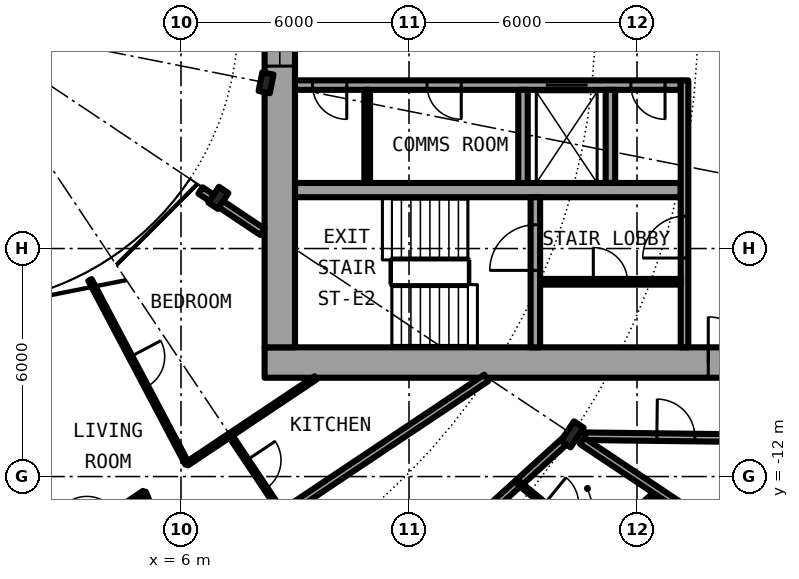
"""IFC4 building model, lengths in metres.
Left out: names, types, materials, properties, quantities, classifications, styles, units other than length and angle.
Written with IfcOpenShell. Run it as: python <this file> out.ifc"""

import sys

from ifc_helpers import new_model, si_unit, direction, frame, frame_2d, origin, origin_2d, place, context, subcontext, project, spatial, rectangle, i_section, extrude, element, fill, save


model = new_model("IFC4")
c1 = context("Model", 3, precision=1e-05, world=origin(), true_north=direction((0.0, 1.0)))
c2 = subcontext(c1, "Body", "Model", "MODEL_VIEW")
j1 = project(units=[si_unit("LENGTHUNIT", "METRE"), si_unit("PLANEANGLEUNIT", "RADIAN")], contexts=[c1])
p1 = place(None, origin())
s1 = spatial("IfcSite", under=j1, at=p1, CompositionType="ELEMENT")
p2 = place(p1, origin())
s2 = spatial("IfcBuilding", under=s1, at=p2, CompositionType="ELEMENT")
p3 = place(p2, frame((0.0, 0.0, 28.9)))
s3 = spatial("IfcBuildingStorey", under=s2, at=p3, CompositionType="ELEMENT", Elevation=28.9)
p4 = place(p3, frame((16.297, -10.889, 0.0), z_axis=(0.0, 0.0, 1.0), x_axis=(0.831469612303, -0.55557023302, 0.0)))
e1 = element("IfcColumn", 1, at=p4, inside=s3, PredefinedType="COLUMN", context=c2, shape_type="SweptSolid", body=[
    extrude(i_section(OverallWidth=0.305, OverallDepth=0.62, WebThickness=0.021, FlangeThickness=0.04, FilletRadius=0.027, at=origin_2d()), origin(), (0.0, 0.0, 1.0), 3.05),
])
for number, where, z_axis, x_axis in (
    (2, (6.984, -4.667, 0.0), (0.0, 0.0, 1.0), (0.831, -0.556, 0.0)),
    (3, (8.239, -1.639, 0.0), (0.0, 0.0, 1.0), (0.981, -0.195, 0.0)),
):
    element("IfcColumn", number, at=place(p3, frame(where, z_axis=z_axis, x_axis=x_axis)), inside=s3, PredefinedType="COLUMN", context=c2, shape_type="SweptSolid", body=[
        extrude(i_section(OverallWidth=0.3, OverallDepth=0.5, WebThickness=0.014, FlangeThickness=0.028, FilletRadius=0.027, at=origin_2d()), origin(), (0.0, 0.0, 1.0), 3.05),
    ])
p5 = place(p3, frame((8.2, -9.0, 0.0), z_axis=(0.0, 0.0, 1.0), x_axis=(1.0, 0.0, 0.0)))
e4 = element("IfcWall", 4, at=p5, inside=s3, PredefinedType="SHEAR", context=c2, shape_type="SweptSolid", body=[
    extrude(rectangle(XDim=14.2, YDim=0.8, at=frame_2d((7.1, 0.0))), origin(), (0.0, 0.0, 1.0), 3.05),
])
p6 = place(p5, frame((11.675, 0.0, 0.0)))
e5 = element("IfcOpeningElement", 5, at=p6, cuts=e4, PredefinedType="OPENING", context=c2, shape_type="SweptSolid", body=[
    extrude(rectangle(XDim=1.2, YDim=2.3, at=frame_2d((0.6, 1.15))), frame((0.0, 0.41, 0.0), z_axis=(0.0, -1.0, 0.0), x_axis=(1.0, 0.0, 0.0)), (0.0, 0.0, 1.0), 0.82),
])
p7 = place(p3, frame((8.6, -8.6, 0.0), z_axis=(0.0, 0.0, 1.0), x_axis=(0.0, 1.0, 0.0)))
e6 = element("IfcWall", 6, at=p7, inside=s3, PredefinedType="SHEAR", context=c2, shape_type="SweptSolid", body=[
    extrude(rectangle(XDim=17.2, YDim=0.8, at=frame_2d((8.6, 0.0))), origin(), (0.0, 0.0, 1.0), 3.05),
])
p8 = place(p7, frame((7.4, 0.0, 0.1)))
e7 = element("IfcOpeningElement", 7, at=p8, cuts=e6, PredefinedType="OPENING", context=c2, shape_type="SweptSolid", body=[
    extrude(rectangle(XDim=2.4, YDim=2.2, at=frame_2d((1.2, 1.1))), frame((0.0, 0.41, 0.0), z_axis=(0.0, -1.0, 0.0), x_axis=(1.0, 0.0, 0.0)), (0.0, 0.0, 1.0), 0.82),
])
p9 = place(p3, frame((19.15, -1.7, 0.0), z_axis=(0.0, 0.0, 1.0), x_axis=(-1.0, 0.0, 0.0)))
e8 = element("IfcWall", 8, at=p9, inside=s3, PredefinedType="SHEAR", context=c2, shape_type="SweptSolid", body=[
    extrude(rectangle(XDim=10.15, YDim=0.25, at=frame_2d((5.075, 0.0))), origin(), (0.0, 0.0, 1.0), 3.05),
])
p10 = place(p9, frame((2.45, 0.0, 0.0)))
e9 = element("IfcOpeningElement", 9, at=p10, cuts=e8, PredefinedType="OPENING", context=c2, shape_type="SweptSolid", body=[
    extrude(rectangle(XDim=1.1, YDim=2.3, at=frame_2d((0.55, 1.15))), frame((0.0, 0.135, 0.0), z_axis=(0.0, -1.0, 0.0), x_axis=(1.0, 0.0, 0.0)), (0.0, 0.0, 1.0), 0.27),
])
p11 = place(p9, frame((8.788, 0.0, 0.0)))
e10 = element("IfcOpeningElement", 10, at=p11, cuts=e8, PredefinedType="OPENING", context=c2, shape_type="SweptSolid", body=[
    extrude(rectangle(XDim=0.9, YDim=2.3, at=frame_2d((0.45, 1.15))), frame((0.0, 0.135, 0.0), z_axis=(0.0, -1.0, 0.0), x_axis=(1.0, 0.0, 0.0)), (0.0, 0.0, 1.0), 0.27),
])
p12 = place(p9, frame((5.775, 0.0, 0.0)))
e11 = element("IfcOpeningElement", 11, at=p12, cuts=e8, PredefinedType="OPENING", context=c2, shape_type="SweptSolid", body=[
    extrude(rectangle(XDim=0.9, YDim=2.3, at=frame_2d((0.45, 1.15))), frame((0.0, 0.135, 0.0), z_axis=(0.0, -1.0, 0.0), x_axis=(1.0, 0.0, 0.0)), (0.0, 0.0, 1.0), 0.27),
])
p13 = place(p9, frame((0.413, 0.0, 0.0)))
e12 = element("IfcOpeningElement", 12, at=p13, cuts=e8, PredefinedType="OPENING", context=c2, shape_type="SweptSolid", body=[
    extrude(rectangle(XDim=0.9, YDim=2.3, at=frame_2d((0.45, 1.15))), frame((0.0, 0.135, 0.0), z_axis=(0.0, -1.0, 0.0), x_axis=(1.0, 0.0, 0.0)), (0.0, 0.0, 1.0), 0.27),
])
p14 = place(p3, frame((9.0, -4.462, 0.0), z_axis=(0.0, 0.0, 1.0), x_axis=(1.0, 0.0, 0.0)))
e13 = element("IfcWall", 13, at=p14, inside=s3, PredefinedType="SHEAR", context=c2, shape_type="SweptSolid", body=[
    extrude(rectangle(XDim=10.15, YDim=0.375, at=frame_2d((5.075, 0.0))), origin(), (0.0, 0.0, 1.0), 3.05),
])
p15 = place(p3, frame((15.325, -8.6, 0.0), z_axis=(0.0, 0.0, 1.0), x_axis=(0.0, 1.0, 0.0)))
e14 = element("IfcWall", 14, at=p15, inside=s3, PredefinedType="SHEAR", context=c2, shape_type="SweptSolid", body=[
    extrude(rectangle(XDim=3.95, YDim=0.25, at=frame_2d((1.975, 0.0))), origin(), (0.0, 0.0, 1.0), 3.05),
])
p16 = place(p15, frame((2.025, 0.0, 0.0)))
e15 = element("IfcOpeningElement", 15, at=p16, cuts=e14, PredefinedType="OPENING", context=c2, shape_type="SweptSolid", body=[
    extrude(rectangle(XDim=1.2, YDim=2.3, at=frame_2d((0.6, 1.15))), frame((0.0, 0.135, 0.0), z_axis=(0.0, -1.0, 0.0), x_axis=(1.0, 0.0, 0.0)), (0.0, 0.0, 1.0), 0.27),
])
for number, where, z_axis, x_axis in (
    (16, (15.0, -1.825, 0.0), (0.0, 0.0, 1.0), (0.0, -1.0, 0.0)),
    (17, (17.3, -1.825, 0.0), (0.0, 0.0, 1.0), (0.0, -1.0, 0.0)),
):
    element("IfcWall", number, at=place(p3, frame(where, z_axis=z_axis, x_axis=x_axis)), inside=s3, PredefinedType="SOLIDWALL", context=c2, shape_type="SweptSolid", body=[
        extrude(rectangle(XDim=2.45, YDim=0.25, at=frame_2d((1.225, 0.0))), origin(), (0.0, 0.0, 1.0), 2.7),
    ])
p17 = place(p3, frame((19.25, -8.6, 0.0), z_axis=(0.0, 0.0, 1.0), x_axis=(0.0, 1.0, 0.0)))
e18 = element("IfcWall", 18, at=p17, inside=s3, PredefinedType="SOLIDWALL", context=c2, shape_type="SweptSolid", body=[
    extrude(rectangle(XDim=7.025, YDim=0.2, at=frame_2d((3.513, 0.0))), origin(), (0.0, 0.0, 1.0), 2.7),
])
p18 = place(p17, frame((2.35, 0.0, 0.0)))
e19 = element("IfcOpeningElement", 19, at=p18, cuts=e18, PredefinedType="OPENING", context=c2, shape_type="SweptSolid", body=[
    extrude(rectangle(XDim=1.1, YDim=2.3, at=frame_2d((0.55, 1.15))), frame((0.0, 0.11, 0.0), z_axis=(0.0, -1.0, 0.0), x_axis=(1.0, 0.0, 0.0)), (0.0, 0.0, 1.0), 0.22),
])
p19 = place(p3, frame((10.9, -1.825, 0.0), z_axis=(0.0, 0.0, 1.0), x_axis=(0.0, -1.0, 0.0)))
e20 = element("IfcWall", 20, at=p19, inside=s3, PredefinedType="PARTITIONING", context=c2, shape_type="SweptSolid", body=[
    extrude(rectangle(XDim=2.45, YDim=0.15, at=frame_2d((1.225, 0.0))), origin(), (0.0, 0.0, 1.0), 2.7),
])
p20 = place(p3, frame((15.45, -6.875, 0.0), z_axis=(0.0, 0.0, 1.0), x_axis=(1.0, 0.0, 0.0)))
e21 = element("IfcWall", 21, at=p20, inside=s3, PredefinedType="PARTITIONING", context=c2, shape_type="SweptSolid", body=[
    extrude(rectangle(XDim=3.7, YDim=0.15, at=frame_2d((1.85, 0.0))), origin(), (0.0, 0.0, 1.0), 2.7),
])
p21 = place(p20, frame((1.4, 0.0, 0.0)))
e22 = element("IfcOpeningElement", 22, at=p21, cuts=e21, PredefinedType="OPENING", context=c2, shape_type="SweptSolid", body=[
    extrude(rectangle(XDim=0.9, YDim=2.3, at=frame_2d((0.45, 1.15))), frame((0.0, 0.085, 0.0), z_axis=(0.0, -1.0, 0.0), x_axis=(1.0, 0.0, 0.0)), (0.0, 0.0, 1.0), 0.17),
])
p22 = place(p3, frame((16.936, -13.845, 0.0), z_axis=(0.0, 0.0, 1.0), x_axis=(0.740836325503, 0.671685595212, 0.0)))
e23 = element("IfcWall", 23, at=p22, inside=s3, PredefinedType="PARTITIONING", context=c2, shape_type="SweptSolid", body=[
    extrude(rectangle(XDim=2.168, YDim=0.1, at=frame_2d((1.084, 0.0))), origin(), (0.0, 0.0, 1.0), 2.7),
])
p23 = place(p3, frame((9.239, -17.286, 0.0), z_axis=(0.0, 0.0, 1.0), x_axis=(0.74089212117, 0.671624050186, 0.0)))
e24 = element("IfcWall", 24, at=p23, inside=s3, PredefinedType="PARTITIONING", context=c2, shape_type="SweptSolid", body=[
    extrude(rectangle(XDim=9.368, YDim=0.2, at=frame_2d((4.684, 0.0))), origin(), (0.0, 0.0, 1.0), 2.38),
])
p24 = place(p23, frame((5.215, 0.0, 0.0)))
e25 = element("IfcOpeningElement", 25, at=p24, cuts=e24, PredefinedType="OPENING", context=c2, shape_type="SweptSolid", body=[
    extrude(rectangle(XDim=1.0, YDim=2.3, at=frame_2d((0.5, 1.15))), frame((0.0, 0.11, 0.0), z_axis=(0.0, -1.0, 0.0), x_axis=(1.0, 0.0, 0.0)), (0.0, 0.0, 1.0), 0.22),
])
p25 = place(p3, frame((3.297, -16.575, 0.0), z_axis=(0.0, 0.0, 1.0), x_axis=(0.831561346449, 0.555432918625, 0.0)))
e26 = element("IfcWall", 26, at=p25, inside=s3, PredefinedType="PARTITIONING", context=c2, shape_type="SweptSolid", body=[
    extrude(rectangle(XDim=12.914, YDim=0.2, at=frame_2d((6.457, 0.0))), origin(), (0.0, 0.0, 1.0), 2.7),
])
p26 = place(p25, frame((4.352, 0.0, 0.0)))
e27 = element("IfcOpeningElement", 27, at=p26, cuts=e26, PredefinedType="OPENING", context=c2, shape_type="SweptSolid", body=[
    extrude(rectangle(XDim=1.0, YDim=2.3, at=frame_2d((0.5, 1.15))), frame((0.0, 0.11, 0.0), z_axis=(0.0, -1.0, 0.0), x_axis=(1.0, 0.0, 0.0)), (0.0, 0.0, 1.0), 0.22),
])
p27 = place(p3, frame((2.77, -13.927, 0.0), z_axis=(0.0, 0.0, 1.0), x_axis=(0.831538390496, 0.555467285384, 0.0)))
e28 = element("IfcWall", 28, at=p27, inside=s3, PredefinedType="PARTITIONING", context=c2, shape_type="SweptSolid", body=[
    extrude(rectangle(XDim=2.717, YDim=0.1, at=frame_2d((1.358, 0.0))), origin(), (0.0, 0.0, 1.0), 2.7),
])
p28 = place(p27, frame((0.908, 0.0, 0.0)))
e29 = element("IfcOpeningElement", 29, at=p28, cuts=e28, PredefinedType="OPENING", context=c2, shape_type="SweptSolid", body=[
    extrude(rectangle(XDim=0.9, YDim=2.3, at=frame_2d((0.45, 1.15))), frame((0.0, 0.06, 0.0), z_axis=(0.0, -1.0, 0.0), x_axis=(1.0, 0.0, 0.0)), (0.0, 0.0, 1.0), 0.12),
])
p29 = place(p3, frame((6.158, -11.664, 0.0), z_axis=(0.0, 0.0, 1.0), x_axis=(0.831459707426, 0.555585056429, 0.0)))
e30 = element("IfcWall", 30, at=p29, inside=s3, PredefinedType="PARTITIONING", context=c2, shape_type="SweptSolid", body=[
    extrude(rectangle(XDim=4.073, YDim=0.1, at=frame_2d((2.037, 0.0))), origin(), (0.0, 0.0, 1.0), 2.7),
])
p30 = place(p3, frame((16.636, -10.939, 0.0), z_axis=(0.0, 0.0, 1.0), x_axis=(0.999926652916, -0.012111514691, 0.0)))
e31 = element("IfcWall", 31, at=p30, inside=s3, PredefinedType="PARTITIONING", context=c2, shape_type="SweptSolid", body=[
    extrude(rectangle(XDim=5.04, YDim=0.2, at=frame_2d((2.52, 0.0))), origin(), (0.0, 0.0, 1.0), 2.7),
])
p31 = place(p30, frame((1.886, 0.0, 0.0)))
e32 = element("IfcOpeningElement", 32, at=p31, cuts=e31, PredefinedType="OPENING", context=c2, shape_type="SweptSolid", body=[
    extrude(rectangle(XDim=1.0, YDim=2.3, at=frame_2d((0.5, 1.15))), frame((0.0, 0.11, 0.0), z_axis=(0.0, -1.0, 0.0), x_axis=(1.0, 0.0, 0.0)), (0.0, 0.0, 1.0), 0.22),
])
p32 = place(p3, frame((6.513, -4.472, 0.0), z_axis=(0.0, 0.0, 1.0), x_axis=(0.831417956244, -0.555647533996, 0.0)))
e33 = element("IfcWall", 33, at=p32, inside=s3, PredefinedType="PARTITIONING", context=c2, shape_type="SweptSolid", body=[
    extrude(rectangle(XDim=1.962, YDim=0.2, at=frame_2d((0.981, 0.0))), origin(), (0.0, 0.0, 1.0), 2.7),
])
p33 = place(p3, frame((3.605, -6.827, 0.0), z_axis=(0.0, 0.0, 1.0), x_axis=(0.466976820365, -0.884269556889, 0.0)))
e34 = element("IfcWall", 34, at=p33, inside=s3, PredefinedType="PARTITIONING", context=c2, shape_type="SweptSolid", body=[
    extrude(rectangle(XDim=5.469, YDim=0.1, at=frame_2d((2.735, 0.0))), origin(), (0.0, 0.0, 1.0), 2.7),
])
p34 = place(p33, frame((2.284, 0.0, 0.0)))
e35 = element("IfcOpeningElement", 35, at=p34, cuts=e34, PredefinedType="OPENING", context=c2, shape_type="SweptSolid", body=[
    extrude(rectangle(XDim=0.9, YDim=2.3, at=frame_2d((0.45, 1.15))), frame((0.0, 0.06, 0.0), z_axis=(0.0, -1.0, 0.0), x_axis=(1.0, 0.0, 0.0)), (0.0, 0.0, 1.0), 0.12),
])
p35 = place(p3, frame((5.029, -12.418, 0.0), z_axis=(0.0, 0.0, 1.0), x_axis=(0.375649498413, -0.926761811008, 0.0)))
e36 = element("IfcWall", 36, at=p35, inside=s3, PredefinedType="PARTITIONING", context=c2, shape_type="SweptSolid", body=[
    extrude(rectangle(XDim=2.548, YDim=0.1, at=frame_2d((1.274, 0.0))), origin(), (0.0, 0.0, 1.0), 2.7),
])
p36 = place(p3, frame((7.289, -10.908, 0.0), z_axis=(0.0, 0.0, 1.0), x_axis=(0.555355163998, -0.831613276602, 0.0)))
e37 = element("IfcWall", 37, at=p36, inside=s3, PredefinedType="PARTITIONING", context=c2, shape_type="SweptSolid", body=[
    extrude(rectangle(XDim=2.494, YDim=0.1, at=frame_2d((1.247, 0.0))), origin(), (0.0, 0.0, 1.0), 2.7),
])
p37 = place(p36, frame((0.797, 0.0, 0.0)))
e38 = element("IfcOpeningElement", 38, at=p37, cuts=e37, PredefinedType="OPENING", context=c2, shape_type="SweptSolid", body=[
    extrude(rectangle(XDim=0.9, YDim=2.3, at=frame_2d((0.45, 1.15))), frame((0.0, 0.06, 0.0), z_axis=(0.0, -1.0, 0.0), x_axis=(1.0, 0.0, 0.0)), (0.0, 0.0, 1.0), 0.12),
])
p38 = place(p3, frame((14.885, -12.168, 0.0), z_axis=(0.0, 0.0, 1.0), x_axis=(0.774162545943, -0.632986850147, 0.0)))
e39 = element("IfcWall", 39, at=p38, inside=s3, PredefinedType="PARTITIONING", context=c2, shape_type="SweptSolid", body=[
    extrude(rectangle(XDim=2.649, YDim=0.1, at=frame_2d((1.325, 0.0))), origin(), (0.0, 0.0, 1.0), 2.7),
])
p39 = place(p38, frame((0.875, 0.0, 0.0)))
e40 = element("IfcOpeningElement", 40, at=p39, cuts=e39, PredefinedType="OPENING", context=c2, shape_type="SweptSolid", body=[
    extrude(rectangle(XDim=0.9, YDim=2.3, at=frame_2d((0.45, 1.15))), frame((0.0, 0.06, 0.0), z_axis=(0.0, -1.0, 0.0), x_axis=(1.0, 0.0, 0.0)), (0.0, 0.0, 1.0), 0.12),
])
p40 = place(p3, frame((16.555, -11.061, 0.0), z_axis=(0.0, 0.0, 1.0), x_axis=(0.831507055747, -0.555514190857, 0.0)))
e41 = element("IfcWall", 41, at=p40, inside=s3, PredefinedType="PARTITIONING", context=c2, shape_type="SweptSolid", body=[
    extrude(rectangle(XDim=7.265, YDim=0.2, at=frame_2d((3.633, 0.0))), origin(), (0.0, 0.0, 1.0), 2.7),
])
p41 = place(p10, origin())
e42 = element("IfcDoor", 42, at=p41, inside=s3, OperationType="DOUBLE_DOOR_SLIDING", PredefinedType="DOOR", context=c2, shape_type="SweptSolid", body=[
    extrude(rectangle(XDim=1.1, YDim=2.3, at=frame_2d((0.55, 1.15))), frame((0.0, 0.025, 0.0), z_axis=(0.0, -1.0, 0.0), x_axis=(1.0, 0.0, 0.0)), (0.0, 0.0, 1.0), 0.05),
])
fill(e9, e42)
p42 = place(p11, origin())
e43 = element("IfcDoor", 43, at=p42, inside=s3, OperationType="SINGLE_SWING_LEFT", PredefinedType="DOOR", context=c2, shape_type="SweptSolid", body=[
    extrude(rectangle(XDim=0.9, YDim=2.3, at=frame_2d((0.45, 1.15))), frame((0.0, 0.025, 0.0), z_axis=(0.0, -1.0, 0.0), x_axis=(1.0, 0.0, 0.0)), (0.0, 0.0, 1.0), 0.05),
])
fill(e10, e43)
p43 = place(p12, origin())
e44 = element("IfcDoor", 44, at=p43, inside=s3, OperationType="SINGLE_SWING_LEFT", PredefinedType="DOOR", context=c2, shape_type="SweptSolid", body=[
    extrude(rectangle(XDim=0.9, YDim=2.3, at=frame_2d((0.45, 1.15))), frame((0.0, 0.025, 0.0), z_axis=(0.0, -1.0, 0.0), x_axis=(1.0, 0.0, 0.0)), (0.0, 0.0, 1.0), 0.05),
])
fill(e11, e44)
p44 = place(p13, origin())
e45 = element("IfcDoor", 45, at=p44, inside=s3, OperationType="SINGLE_SWING_RIGHT", PredefinedType="DOOR", context=c2, shape_type="SweptSolid", body=[
    extrude(rectangle(XDim=0.9, YDim=2.3, at=frame_2d((0.45, 1.15))), frame((0.0, 0.025, 0.0), z_axis=(0.0, -1.0, 0.0), x_axis=(1.0, 0.0, 0.0)), (0.0, 0.0, 1.0), 0.05),
])
fill(e12, e45)
p45 = place(p21, origin())
e46 = element("IfcDoor", 46, at=p45, inside=s3, OperationType="SINGLE_SWING_LEFT", PredefinedType="DOOR", context=c2, shape_type="SweptSolid", body=[
    extrude(rectangle(XDim=0.9, YDim=2.3, at=frame_2d((0.45, 1.15))), frame((0.0, 0.025, 0.0), z_axis=(0.0, -1.0, 0.0), x_axis=(1.0, 0.0, 0.0)), (0.0, 0.0, 1.0), 0.05),
])
fill(e22, e46)
p46 = place(p16, origin())
e47 = element("IfcDoor", 47, at=p46, inside=s3, OperationType="SINGLE_SWING_LEFT", PredefinedType="DOOR", context=c2, shape_type="SweptSolid", body=[
    extrude(rectangle(XDim=1.2, YDim=2.3, at=frame_2d((0.6, 1.15))), frame((0.0, 0.025, 0.0), z_axis=(0.0, -1.0, 0.0), x_axis=(1.0, 0.0, 0.0)), (0.0, 0.0, 1.0), 0.05),
])
fill(e15, e47)
p47 = place(p18, origin())
e48 = element("IfcDoor", 48, at=p47, inside=s3, OperationType="SINGLE_SWING_RIGHT", PredefinedType="DOOR", context=c2, shape_type="SweptSolid", body=[
    extrude(rectangle(XDim=1.1, YDim=2.3, at=frame_2d((0.55, 1.15))), frame((0.0, 0.025, 0.0), z_axis=(0.0, -1.0, 0.0), x_axis=(1.0, 0.0, 0.0)), (0.0, 0.0, 1.0), 0.05),
])
fill(e19, e48)
p48 = place(p6, origin())
e49 = element("IfcDoor", 49, at=p48, inside=s3, OperationType="SINGLE_SWING_LEFT", PredefinedType="DOOR", context=c2, shape_type="SweptSolid", body=[
    extrude(rectangle(XDim=1.2, YDim=2.3, at=frame_2d((0.6, 1.15))), frame((0.0, 0.025, 0.0), z_axis=(0.0, -1.0, 0.0), x_axis=(1.0, 0.0, 0.0)), (0.0, 0.0, 1.0), 0.05),
])
fill(e5, e49)
p49 = place(p8, origin())
e50 = element("IfcWindow", 50, at=p49, inside=s3, PartitioningType="SINGLE_PANEL", PredefinedType="WINDOW", context=c2, shape_type="SweptSolid", body=[
    extrude(rectangle(XDim=2.4, YDim=2.2, at=frame_2d((1.2, 1.1))), frame((0.0, 0.03, 0.0), z_axis=(0.0, -1.0, 0.0), x_axis=(1.0, 0.0, 0.0)), (0.0, 0.0, 1.0), 0.06),
])
fill(e7, e50)
p50 = place(p37, origin())
e51 = element("IfcDoor", 51, at=p50, inside=s3, OperationType="SINGLE_SWING_RIGHT", PredefinedType="DOOR", context=c2, shape_type="SweptSolid", body=[
    extrude(rectangle(XDim=0.9, YDim=2.3, at=frame_2d((0.45, 1.15))), frame((0.0, 0.025, 0.0), z_axis=(0.0, -1.0, 0.0), x_axis=(1.0, 0.0, 0.0)), (0.0, 0.0, 1.0), 0.05),
])
fill(e38, e51)
p51 = place(p34, origin())
e52 = element("IfcDoor", 52, at=p51, inside=s3, OperationType="SINGLE_SWING_RIGHT", PredefinedType="DOOR", context=c2, shape_type="SweptSolid", body=[
    extrude(rectangle(XDim=0.9, YDim=2.3, at=frame_2d((0.45, 1.15))), frame((0.0, 0.025, 0.0), z_axis=(0.0, -1.0, 0.0), x_axis=(1.0, 0.0, 0.0)), (0.0, 0.0, 1.0), 0.05),
])
fill(e35, e52)
p52 = place(p31, origin())
e53 = element("IfcDoor", 53, at=p52, inside=s3, OperationType="SINGLE_SWING_LEFT", PredefinedType="DOOR", context=c2, shape_type="SweptSolid", body=[
    extrude(rectangle(XDim=1.0, YDim=2.3, at=frame_2d((0.5, 1.15))), frame((0.0, 0.025, 0.0), z_axis=(0.0, -1.0, 0.0), x_axis=(1.0, 0.0, 0.0)), (0.0, 0.0, 1.0), 0.05),
])
fill(e32, e53)
save(model, sys.argv[1])
